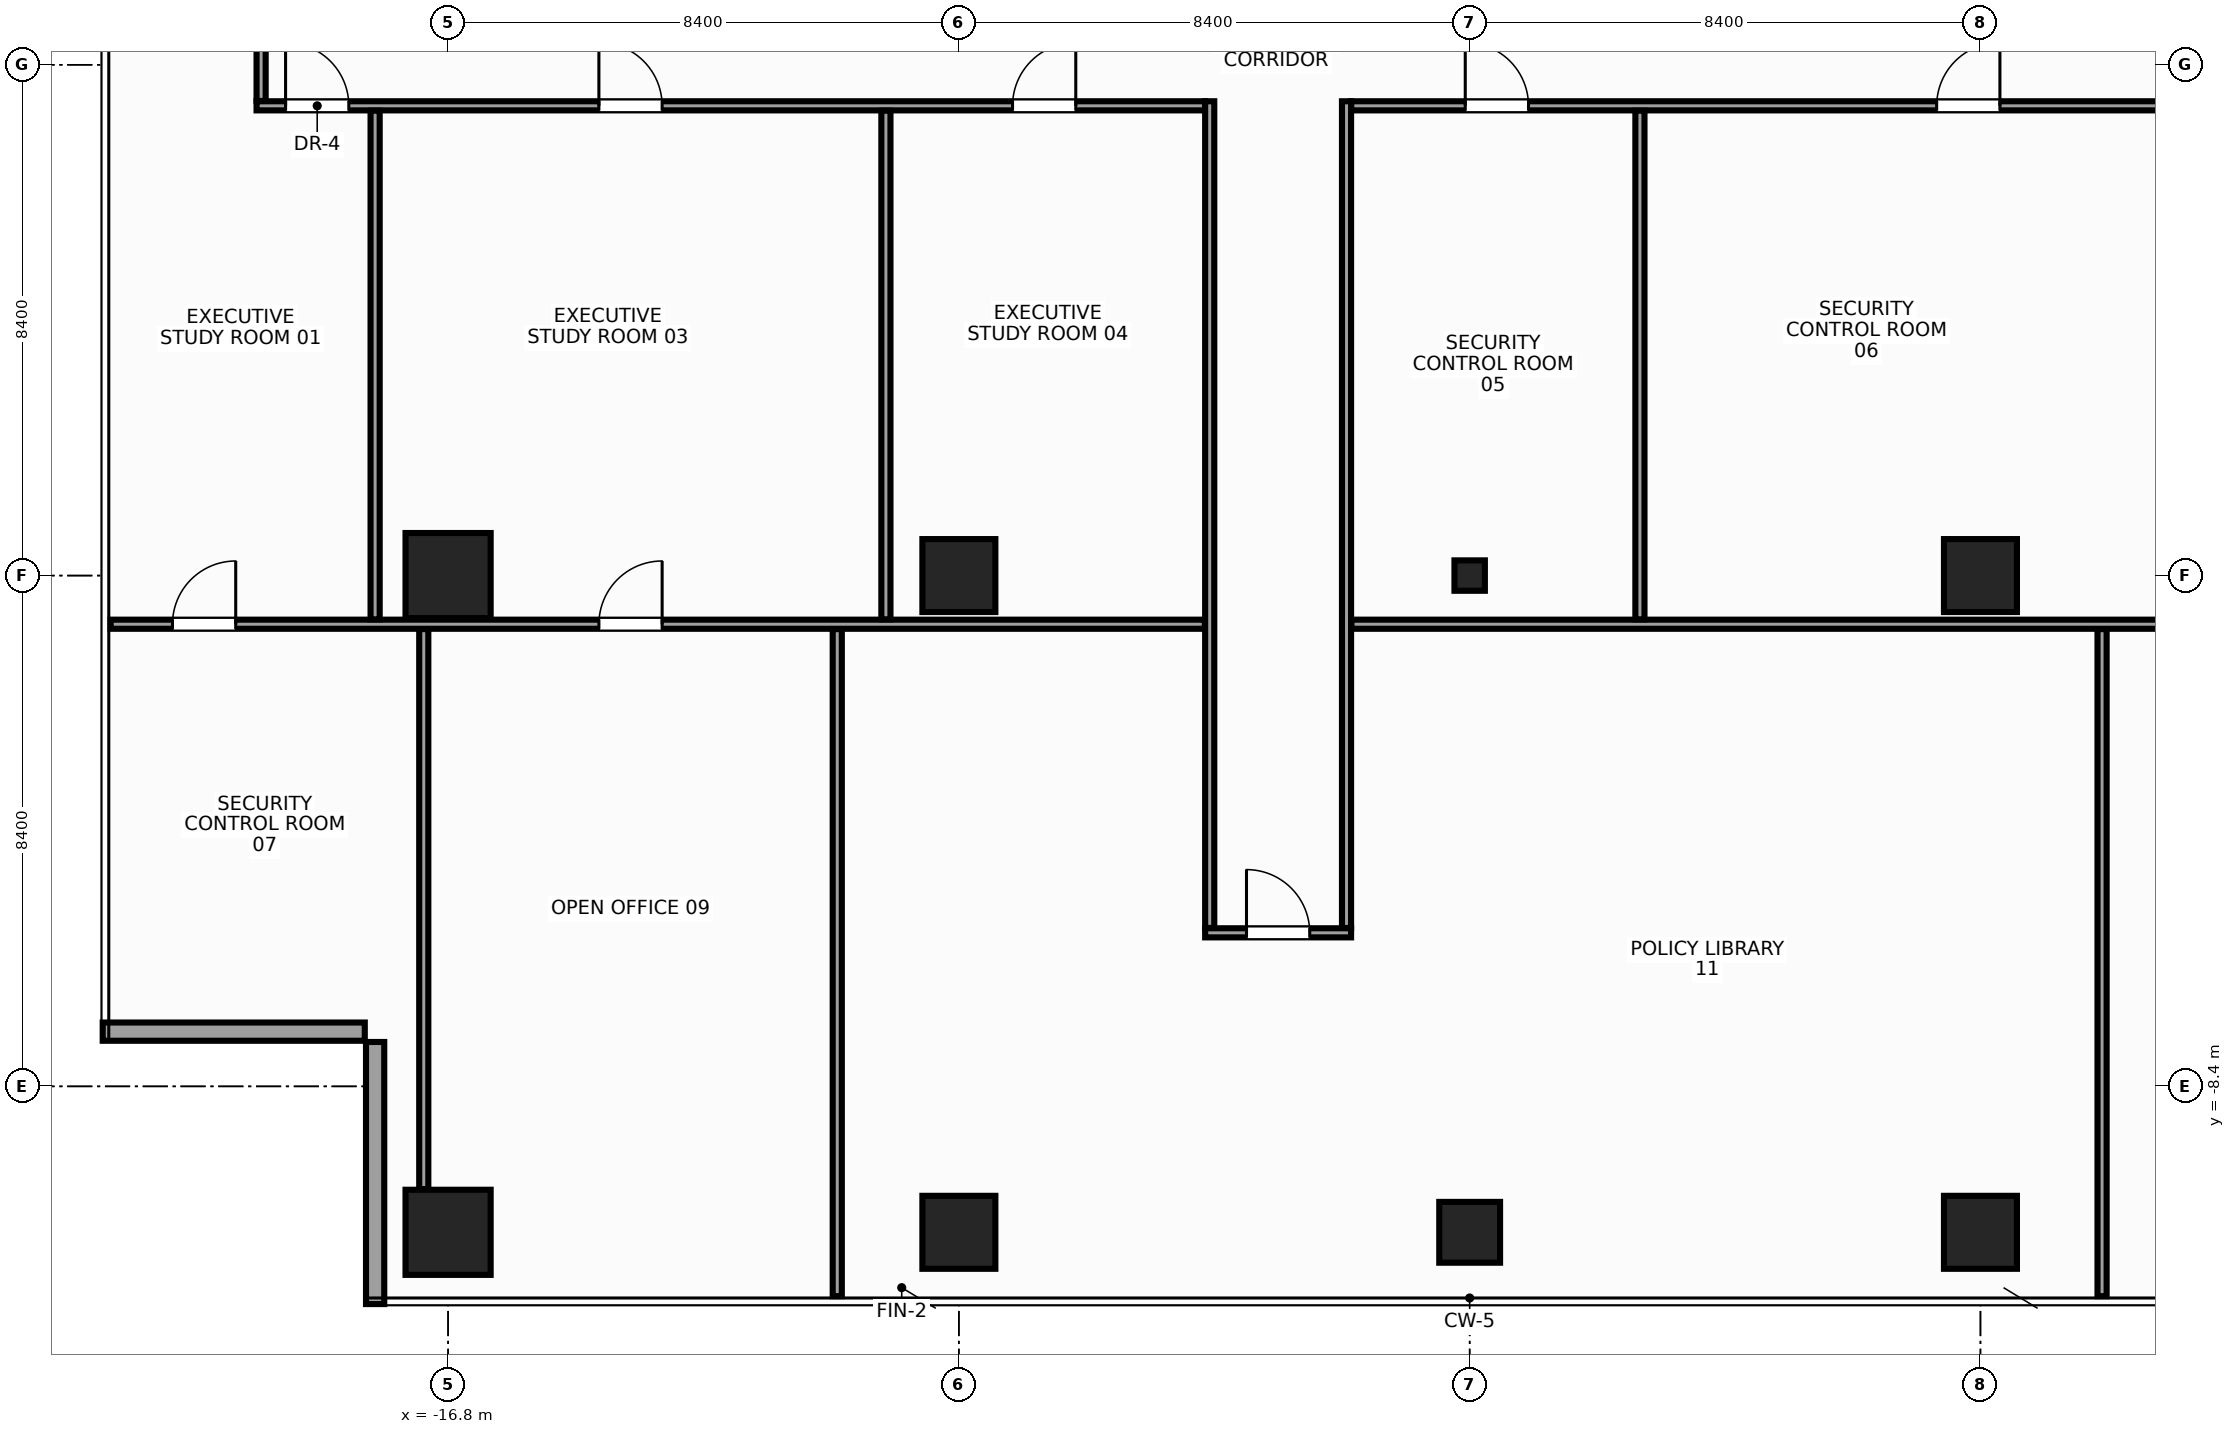
"""IFC4 building model, lengths in metres.
Left out: names, types, materials, properties, quantities, classifications, styles, units other than length and angle.
Written with IfcOpenShell. Run it as: python <this file> out.ifc"""

import sys

from ifc_helpers import new_model, si_unit, direction, frame, frame_2d, origin, origin_with_axes, origin_2d, place, context, subcontext, project, spatial, rectangle, hollow_rectangle, extrude, source, transform, mapped, element, fill, save


model = new_model("IFC4")
c1 = context("Model", 3, precision=1e-05, world=origin(), true_north=direction((0.0, 1.0)))
c2 = subcontext(c1, "Body", "Model", "MODEL_VIEW")
j1 = project(units=[si_unit("LENGTHUNIT", "METRE"), si_unit("PLANEANGLEUNIT", "RADIAN")], contexts=[c1])
p1 = place(None, origin())
s1 = spatial("IfcSite", under=j1, at=p1, CompositionType="ELEMENT")
p2 = place(p1, origin())
s2 = spatial("IfcBuilding", under=s1, at=p2, CompositionType="ELEMENT")
p3 = place(p2, frame((0.0, 0.0, 243.2)))
s3 = spatial("IfcBuildingStorey", under=s2, at=p3, CompositionType="ELEMENT", Elevation=243.2)
m1 = source(origin(), c2, "Body", "SweptSolid", [
    extrude(rectangle(XDim=1.4, YDim=1.4, at=origin_2d()), origin(), (0.0, 0.0, 1.0), 3.6),
])
for number, where, z_axis, x_axis in (
    (1, (-16.8, -10.8, 0.0), (0.0, 0.0, 1.0), (1.0, 0.0, 0.0)),
    (2, (-16.8, 0.0, 0.0), (0.0, 0.0, 1.0), (1.0, 0.0, 0.0)),
):
    element("IfcColumn", number, at=place(p3, frame(where, z_axis=z_axis, x_axis=x_axis)), inside=s3, PredefinedType="COLUMN", context=c2, shape_type="MappedRepresentation", body=[
        mapped(m1, transform((0.0, 0.0, 0.0), x_axis=(1.0, 0.0, 0.0), y_axis=(0.0, 1.0, 0.0), z_axis=(0.0, 0.0, 1.0), scale=1.0)),
    ])
m2 = source(origin(), c2, "Body", "SweptSolid", [
    extrude(rectangle(XDim=1.2, YDim=1.2, at=origin_2d()), origin(), (0.0, 0.0, 1.0), 3.6),
])
for number, where, z_axis, x_axis in (
    (3, (-8.4, 0.0, 0.0), (0.0, 0.0, 1.0), (1.0, 0.0, 0.0)),
    (4, (-8.4, -10.8, 0.0), (0.0, 0.0, 1.0), (1.0, 0.0, 0.0)),
    (5, (8.4, 0.0, 0.0), (0.0, 0.0, 1.0), (1.0, 0.0, 0.0)),
    (6, (8.4, -10.8, 0.0), (0.0, 0.0, 1.0), (1.0, 0.0, 0.0)),
):
    element("IfcColumn", number, at=place(p3, frame(where, z_axis=z_axis, x_axis=x_axis)), inside=s3, PredefinedType="COLUMN", context=c2, shape_type="MappedRepresentation", body=[
        mapped(m2, transform((0.0, 0.0, 0.0), x_axis=(1.0, 0.0, 0.0), y_axis=(0.0, 1.0, 0.0), z_axis=(0.0, 0.0, 1.0), scale=1.0)),
    ])
m3 = source(origin(), c2, "Body", "SweptSolid", [
    extrude(rectangle(XDim=1.0, YDim=1.0, at=origin_2d()), origin(), (0.0, 0.0, 1.0), 3.6),
])
p4 = place(p3, frame((0.0, -10.8, 0.0), z_axis=(0.0, 0.0, 1.0), x_axis=(1.0, 0.0, 0.0)))
e7 = element("IfcColumn", 7, at=p4, inside=s3, PredefinedType="COLUMN", context=c2, shape_type="MappedRepresentation", body=[
    mapped(m3, transform((0.0, 0.0, 0.0), x_axis=(1.0, 0.0, 0.0), y_axis=(0.0, 1.0, 0.0), z_axis=(0.0, 0.0, 1.0), scale=1.0)),
])
m4 = source(origin(), c2, "Body", "SweptSolid", [
    extrude(hollow_rectangle(XDim=0.5, YDim=0.5, WallThickness=0.025, at=origin_2d()), origin(), (0.0, 0.0, 1.0), 3.6),
])
p5 = place(p3, origin_with_axes())
e8 = element("IfcColumn", 8, at=p5, inside=s3, PredefinedType="COLUMN", context=c2, shape_type="MappedRepresentation", body=[
    mapped(m4, transform((0.0, 0.0, 0.0), x_axis=(1.0, 0.0, 0.0), y_axis=(0.0, 1.0, 0.0), z_axis=(0.0, 0.0, 1.0), scale=1.0)),
])
m5 = source(origin(), c2, "Body", "SweptSolid", [
    extrude(rectangle(XDim=4.31, YDim=0.3, at=frame_2d((2.155, 0.0))), origin(), (0.0, 0.0, 1.0), 2.75),
])
for number, where, z_axis, x_axis in (
    (9, (-22.48, -7.5, 0.0), (0.0, 0.0, 1.0), (1.0, 0.0, 0.0)),
    (10, (-18.0, -7.67, 0.0), (0.0, 0.0, 1.0), (0.0, -1.0, 0.0)),
):
    element("IfcWall", number, at=place(p3, frame(where, z_axis=z_axis, x_axis=x_axis)), inside=s3, PredefinedType="STANDARD", context=c2, shape_type="MappedRepresentation", body=[
        mapped(m5, transform((0.0, 0.0, 0.0), x_axis=(1.0, 0.0, 0.0), y_axis=(0.0, 1.0, 0.0), z_axis=(0.0, 0.0, 1.0), scale=1.0)),
    ])
m6 = source(origin(), c2, "Body", "SweptSolid", [
    extrude(rectangle(XDim=15.6, YDim=0.15, at=frame_2d((7.8, 0.0))), origin(), (0.0, 0.0, 1.0), 2.755),
])
p6 = place(p3, frame((-19.95, 7.725, 0.0), z_axis=(0.0, 0.0, 1.0), x_axis=(1.0, 0.0, 0.0)))
e11 = element("IfcWall", 11, at=p6, inside=s3, PredefinedType="PARTITIONING", context=c2, shape_type="MappedRepresentation", body=[
    mapped(m6, transform((0.0, 0.0, 0.0), x_axis=(1.0, 0.0, 0.0), y_axis=(0.0, 1.0, 0.0), z_axis=(0.0, 0.0, 1.0), scale=1.0)),
])
p7 = place(p6, frame((0.478, 0.0, 0.0)))
e12 = element("IfcOpeningElement", 12, at=p7, cuts=e11, PredefinedType="OPENING", context=c2, shape_type="SweptSolid", body=[
    extrude(rectangle(XDim=1.04, YDim=2.2, at=frame_2d((0.52, 1.1))), frame((0.0, 0.087, 0.0), z_axis=(0.0, -1.0, 0.0), x_axis=(1.0, 0.0, 0.0)), (0.0, 0.0, 1.0), 0.174),
])
p8 = place(p6, frame((5.63, 0.0, 0.0)))
e13 = element("IfcOpeningElement", 13, at=p8, cuts=e11, PredefinedType="OPENING", context=c2, shape_type="SweptSolid", body=[
    extrude(rectangle(XDim=1.04, YDim=2.2, at=frame_2d((0.52, 1.1))), frame((0.0, 0.087, 0.0), z_axis=(0.0, -1.0, 0.0), x_axis=(1.0, 0.0, 0.0)), (0.0, 0.0, 1.0), 0.174),
])
p9 = place(p6, frame((12.433, 0.0, 0.0)))
e14 = element("IfcOpeningElement", 14, at=p9, cuts=e11, PredefinedType="OPENING", context=c2, shape_type="SweptSolid", body=[
    extrude(rectangle(XDim=1.04, YDim=2.2, at=frame_2d((0.52, 1.1))), frame((0.0, 0.087, 0.0), z_axis=(0.0, -1.0, 0.0), x_axis=(1.0, 0.0, 0.0)), (0.0, 0.0, 1.0), 0.174),
])
m7 = source(origin(), c2, "Body", "SweptSolid", [
    extrude(rectangle(XDim=21.9, YDim=0.15, at=frame_2d((10.95, 0.0))), origin(), (0.0, 0.0, 1.0), 2.755),
])
p10 = place(p3, frame((-1.95, 7.725, 0.0), z_axis=(0.0, 0.0, 1.0), x_axis=(1.0, 0.0, 0.0)))
e15 = element("IfcWall", 15, at=p10, inside=s3, PredefinedType="PARTITIONING", context=c2, shape_type="MappedRepresentation", body=[
    mapped(m7, transform((0.0, 0.0, 0.0), x_axis=(1.0, 0.0, 0.0), y_axis=(0.0, 1.0, 0.0), z_axis=(0.0, 0.0, 1.0), scale=1.0)),
])
p11 = place(p10, frame((17.742, 0.0, 0.0)))
e16 = element("IfcOpeningElement", 16, at=p11, cuts=e15, PredefinedType="OPENING", context=c2, shape_type="SweptSolid", body=[
    extrude(rectangle(XDim=1.04, YDim=2.2, at=frame_2d((0.52, 1.1))), frame((0.0, 0.087, 0.0), z_axis=(0.0, -1.0, 0.0), x_axis=(1.0, 0.0, 0.0)), (0.0, 0.0, 1.0), 0.174),
])
p12 = place(p10, frame((1.877, 0.0, 0.0)))
e17 = element("IfcOpeningElement", 17, at=p12, cuts=e15, PredefinedType="OPENING", context=c2, shape_type="SweptSolid", body=[
    extrude(rectangle(XDim=1.04, YDim=2.2, at=frame_2d((0.52, 1.1))), frame((0.0, 0.087, 0.0), z_axis=(0.0, -1.0, 0.0), x_axis=(1.0, 0.0, 0.0)), (0.0, 0.0, 1.0), 0.174),
])
p13 = place(p10, frame((9.63, 0.0, 0.0)))
e18 = element("IfcOpeningElement", 18, at=p13, cuts=e15, PredefinedType="OPENING", context=c2, shape_type="SweptSolid", body=[
    extrude(rectangle(XDim=1.04, YDim=2.2, at=frame_2d((0.52, 1.1))), frame((0.0, 0.087, 0.0), z_axis=(0.0, -1.0, 0.0), x_axis=(1.0, 0.0, 0.0)), (0.0, 0.0, 1.0), 0.174),
])
m8 = source(origin(), c2, "Body", "SweptSolid", [
    extrude(rectangle(XDim=2.4, YDim=0.15, at=frame_2d((1.2, 0.0))), origin(), (0.0, 0.0, 1.0), 3.37),
])
p14 = place(p3, frame((-4.35, -5.875, 0.0), z_axis=(0.0, 0.0, 1.0), x_axis=(1.0, 0.0, 0.0)))
e19 = element("IfcWall", 19, at=p14, inside=s3, PredefinedType="PARTITIONING", context=c2, shape_type="MappedRepresentation", body=[
    mapped(m8, transform((0.0, 0.0, 0.0), x_axis=(1.0, 0.0, 0.0), y_axis=(0.0, 1.0, 0.0), z_axis=(0.0, 0.0, 1.0), scale=1.0)),
])
p15 = place(p14, frame((0.68, 0.0, 0.0)))
e20 = element("IfcOpeningElement", 20, at=p15, cuts=e19, PredefinedType="OPENING", context=c2, shape_type="SweptSolid", body=[
    extrude(rectangle(XDim=1.04, YDim=2.2, at=frame_2d((0.52, 1.1))), frame((0.0, 0.087, 0.0), z_axis=(0.0, -1.0, 0.0), x_axis=(1.0, 0.0, 0.0)), (0.0, 0.0, 1.0), 0.174),
])
m9 = source(origin(), c2, "Body", "SweptSolid", [
    extrude(rectangle(XDim=2.115, YDim=0.15, at=frame_2d((1.058, 0.0))), origin(), (0.0, 0.0, 1.0), 3.37),
])
p16 = place(p3, frame((-19.875, 7.805, 0.0), z_axis=(0.0, 0.0, 1.0), x_axis=(0.0, 1.0, 0.0)))
e21 = element("IfcWall", 21, at=p16, inside=s3, PredefinedType="PARTITIONING", context=c2, shape_type="MappedRepresentation", body=[
    mapped(m9, transform((0.0, 0.0, 0.0), x_axis=(1.0, 0.0, 0.0), y_axis=(0.0, 1.0, 0.0), z_axis=(0.0, 0.0, 1.0), scale=1.0)),
])
m10 = source(origin(), c2, "Body", "SweptSolid", [
    extrude(rectangle(XDim=13.595, YDim=0.15, at=frame_2d((6.797, 0.0))), origin(), (0.0, 0.0, 1.0), 2.655),
])
for number, where, z_axis, x_axis in (
    (22, (-4.275, -5.795, 0.0), (0.0, 0.0, 1.0), (0.0, 1.0, 0.0)),
    (23, (-2.025, -5.795, 0.0), (0.0, 0.0, 1.0), (0.0, 1.0, 0.0)),
):
    element("IfcWall", number, at=place(p3, frame(where, z_axis=z_axis, x_axis=x_axis)), inside=s3, PredefinedType="PARTITIONING", context=c2, shape_type="MappedRepresentation", body=[
        mapped(m10, transform((0.0, 0.0, 0.0), x_axis=(1.0, 0.0, 0.0), y_axis=(0.0, 1.0, 0.0), z_axis=(0.0, 0.0, 1.0), scale=1.0)),
    ])
m11 = source(origin(), c2, "Body", "SweptSolid", [
    extrude(rectangle(XDim=17.995, YDim=0.15, at=frame_2d((8.998, 0.0))), origin(), (0.0, 0.0, 1.0), 2.755),
])
p17 = place(p3, frame((-22.35, -0.8, 0.0), z_axis=(0.0, 0.0, 1.0), x_axis=(1.0, 0.0, 0.0)))
e24 = element("IfcWall", 24, at=p17, inside=s3, PredefinedType="PARTITIONING", context=c2, shape_type="MappedRepresentation", body=[
    mapped(m11, transform((0.0, 0.0, 0.0), x_axis=(1.0, 0.0, 0.0), y_axis=(0.0, 1.0, 0.0), z_axis=(0.0, 0.0, 1.0), scale=1.0)),
])
p18 = place(p17, frame((1.018, 0.0, 0.0)))
e25 = element("IfcOpeningElement", 25, at=p18, cuts=e24, PredefinedType="OPENING", context=c2, shape_type="SweptSolid", body=[
    extrude(rectangle(XDim=1.04, YDim=2.2, at=frame_2d((0.52, 1.1))), frame((0.0, 0.087, 0.0), z_axis=(0.0, -1.0, 0.0), x_axis=(1.0, 0.0, 0.0)), (0.0, 0.0, 1.0), 0.174),
])
p19 = place(p17, frame((8.03, 0.0, 0.0)))
e26 = element("IfcOpeningElement", 26, at=p19, cuts=e24, PredefinedType="OPENING", context=c2, shape_type="SweptSolid", body=[
    extrude(rectangle(XDim=1.04, YDim=2.2, at=frame_2d((0.52, 1.1))), frame((0.0, 0.087, 0.0), z_axis=(0.0, -1.0, 0.0), x_axis=(1.0, 0.0, 0.0)), (0.0, 0.0, 1.0), 0.174),
])
m12 = source(origin(), c2, "Body", "SweptSolid", [
    extrude(rectangle(XDim=24.295, YDim=0.15, at=frame_2d((12.147, 0.0))), origin(), (0.0, 0.0, 1.0), 2.755),
])
p20 = place(p3, frame((-1.945, -0.8, 0.0), z_axis=(0.0, 0.0, 1.0), x_axis=(1.0, 0.0, 0.0)))
e27 = element("IfcWall", 27, at=p20, inside=s3, PredefinedType="PARTITIONING", context=c2, shape_type="MappedRepresentation", body=[
    mapped(m12, transform((0.0, 0.0, 0.0), x_axis=(1.0, 0.0, 0.0), y_axis=(0.0, 1.0, 0.0), z_axis=(0.0, 0.0, 1.0), scale=1.0)),
])
p21 = place(p20, frame((22.278, 0.0, 0.0)))
e28 = element("IfcOpeningElement", 28, at=p21, cuts=e27, PredefinedType="OPENING", context=c2, shape_type="SweptSolid", body=[
    extrude(rectangle(XDim=1.04, YDim=2.2, at=frame_2d((0.52, 1.1))), frame((0.0, 0.087, 0.0), z_axis=(0.0, -1.0, 0.0), x_axis=(1.0, 0.0, 0.0)), (0.0, 0.0, 1.0), 0.174),
])
p22 = place(p20, frame((15.945, 0.0, 0.0)))
e29 = element("IfcOpeningElement", 29, at=p22, cuts=e27, PredefinedType="OPENING", context=c2, shape_type="SweptSolid", body=[
    extrude(rectangle(XDim=1.04, YDim=2.2, at=frame_2d((0.52, 1.1))), frame((0.0, 0.087, 0.0), z_axis=(0.0, -1.0, 0.0), x_axis=(1.0, 0.0, 0.0)), (0.0, 0.0, 1.0), 0.174),
])
m13 = source(origin(), c2, "Body", "SweptSolid", [
    extrude(rectangle(XDim=8.365, YDim=0.15, at=frame_2d((4.183, 0.0))), origin(), (0.0, 0.0, 1.0), 3.37),
])
p23 = place(p3, frame((-18.0, -0.72, 0.0), z_axis=(0.0, 0.0, 1.0), x_axis=(0.0, 1.0, 0.0)))
e30 = element("IfcWall", 30, at=p23, inside=s3, PredefinedType="PARTITIONING", context=c2, shape_type="MappedRepresentation", body=[
    mapped(m13, transform((0.0, 0.0, 0.0), x_axis=(1.0, 0.0, 0.0), y_axis=(0.0, 1.0, 0.0), z_axis=(0.0, 0.0, 1.0), scale=1.0)),
])
m14 = source(origin(), c2, "Body", "SweptSolid", [
    extrude(rectangle(XDim=8.365, YDim=0.15, at=frame_2d((4.183, 0.0))), origin(), (0.0, 0.0, 1.0), 2.655),
])
for number, where, z_axis, x_axis in (
    (31, (-9.6, -0.72, 0.0), (0.0, 0.0, 1.0), (0.0, 1.0, 0.0)),
    (32, (2.8, -0.72, 0.0), (0.0, 0.0, 1.0), (0.0, 1.0, 0.0)),
):
    element("IfcWall", number, at=place(p3, frame(where, z_axis=z_axis, x_axis=x_axis)), inside=s3, PredefinedType="PARTITIONING", context=c2, shape_type="MappedRepresentation", body=[
        mapped(m14, transform((0.0, 0.0, 0.0), x_axis=(1.0, 0.0, 0.0), y_axis=(0.0, 1.0, 0.0), z_axis=(0.0, 0.0, 1.0), scale=1.0)),
    ])
m15 = source(origin(), c2, "Body", "SweptSolid", [
    extrude(rectangle(XDim=9.21, YDim=0.15, at=frame_2d((4.605, 0.0))), origin(), (0.0, 0.0, 1.0), 3.37),
])
p24 = place(p3, frame((-17.2, -10.09, 0.0), z_axis=(0.0, 0.0, 1.0), x_axis=(0.0, 1.0, 0.0)))
e33 = element("IfcWall", 33, at=p24, inside=s3, PredefinedType="PARTITIONING", context=c2, shape_type="MappedRepresentation", body=[
    mapped(m15, transform((0.0, 0.0, 0.0), x_axis=(1.0, 0.0, 0.0), y_axis=(0.0, 1.0, 0.0), z_axis=(0.0, 0.0, 1.0), scale=1.0)),
])
m16 = source(origin(), c2, "Body", "SweptSolid", [
    extrude(rectangle(XDim=10.97, YDim=0.15, at=frame_2d((5.485, 0.0))), origin(), (0.0, 0.0, 1.0), 2.905),
])
for number, where, z_axis, x_axis in (
    (34, (-10.4, -11.85, 0.0), (0.0, 0.0, 1.0), (0.0, 1.0, 0.0)),
    (35, (10.4, -11.85, 0.0), (0.0, 0.0, 1.0), (0.0, 1.0, 0.0)),
):
    element("IfcWall", number, at=place(p3, frame(where, z_axis=z_axis, x_axis=x_axis)), inside=s3, PredefinedType="PARTITIONING", context=c2, shape_type="MappedRepresentation", body=[
        mapped(m16, transform((0.0, 0.0, 0.0), x_axis=(1.0, 0.0, 0.0), y_axis=(0.0, 1.0, 0.0), z_axis=(0.0, 0.0, 1.0), scale=1.0)),
    ])
m17 = source(origin(), c2, "Body", "SweptSolid", [
    extrude(rectangle(XDim=1.04, YDim=2.2, at=frame_2d((0.52, 1.1))), frame((0.0, 0.025, 0.0), z_axis=(0.0, -1.0, 0.0), x_axis=(1.0, 0.0, 0.0)), (0.0, 0.0, 1.0), 0.05),
])
p25 = place(p7, origin())
e36 = element("IfcDoor", 36, at=p25, inside=s3, OperationType="SINGLE_SWING_LEFT", PredefinedType="DOOR", context=c2, shape_type="MappedRepresentation", body=[
    mapped(m17, transform((0.0, 0.0, 0.0), x_axis=(1.0, 0.0, 0.0), y_axis=(0.0, 1.0, 0.0), z_axis=(0.0, 0.0, 1.0), scale=1.0)),
])
fill(e12, e36)
p26 = place(p8, origin())
e37 = element("IfcDoor", 37, at=p26, inside=s3, OperationType="SINGLE_SWING_LEFT", PredefinedType="DOOR", context=c2, shape_type="MappedRepresentation", body=[
    mapped(m17, transform((0.0, 0.0, 0.0), x_axis=(1.0, 0.0, 0.0), y_axis=(0.0, 1.0, 0.0), z_axis=(0.0, 0.0, 1.0), scale=1.0)),
])
fill(e13, e37)
p27 = place(p9, origin())
e38 = element("IfcDoor", 38, at=p27, inside=s3, OperationType="SINGLE_SWING_RIGHT", PredefinedType="DOOR", context=c2, shape_type="MappedRepresentation", body=[
    mapped(m17, transform((0.0, 0.0, 0.0), x_axis=(1.0, 0.0, 0.0), y_axis=(0.0, 1.0, 0.0), z_axis=(0.0, 0.0, 1.0), scale=1.0)),
])
fill(e14, e38)
p28 = place(p12, origin())
e39 = element("IfcDoor", 39, at=p28, inside=s3, OperationType="SINGLE_SWING_LEFT", PredefinedType="DOOR", context=c2, shape_type="MappedRepresentation", body=[
    mapped(m17, transform((0.0, 0.0, 0.0), x_axis=(1.0, 0.0, 0.0), y_axis=(0.0, 1.0, 0.0), z_axis=(0.0, 0.0, 1.0), scale=1.0)),
])
fill(e17, e39)
p29 = place(p13, origin())
e40 = element("IfcDoor", 40, at=p29, inside=s3, OperationType="SINGLE_SWING_RIGHT", PredefinedType="DOOR", context=c2, shape_type="MappedRepresentation", body=[
    mapped(m17, transform((0.0, 0.0, 0.0), x_axis=(1.0, 0.0, 0.0), y_axis=(0.0, 1.0, 0.0), z_axis=(0.0, 0.0, 1.0), scale=1.0)),
])
fill(e18, e40)
p30 = place(p15, origin())
e41 = element("IfcDoor", 41, at=p30, inside=s3, OperationType="SINGLE_SWING_LEFT", PredefinedType="DOOR", context=c2, shape_type="MappedRepresentation", body=[
    mapped(m17, transform((0.0, 0.0, 0.0), x_axis=(1.0, 0.0, 0.0), y_axis=(0.0, 1.0, 0.0), z_axis=(0.0, 0.0, 1.0), scale=1.0)),
])
fill(e20, e41)
p31 = place(p18, origin())
e42 = element("IfcDoor", 42, at=p31, inside=s3, OperationType="SINGLE_SWING_RIGHT", PredefinedType="DOOR", context=c2, shape_type="MappedRepresentation", body=[
    mapped(m17, transform((0.0, 0.0, 0.0), x_axis=(1.0, 0.0, 0.0), y_axis=(0.0, 1.0, 0.0), z_axis=(0.0, 0.0, 1.0), scale=1.0)),
])
fill(e25, e42)
p32 = place(p19, origin())
e43 = element("IfcDoor", 43, at=p32, inside=s3, OperationType="SINGLE_SWING_RIGHT", PredefinedType="DOOR", context=c2, shape_type="MappedRepresentation", body=[
    mapped(m17, transform((0.0, 0.0, 0.0), x_axis=(1.0, 0.0, 0.0), y_axis=(0.0, 1.0, 0.0), z_axis=(0.0, 0.0, 1.0), scale=1.0)),
])
fill(e26, e43)
save(model, sys.argv[1])
